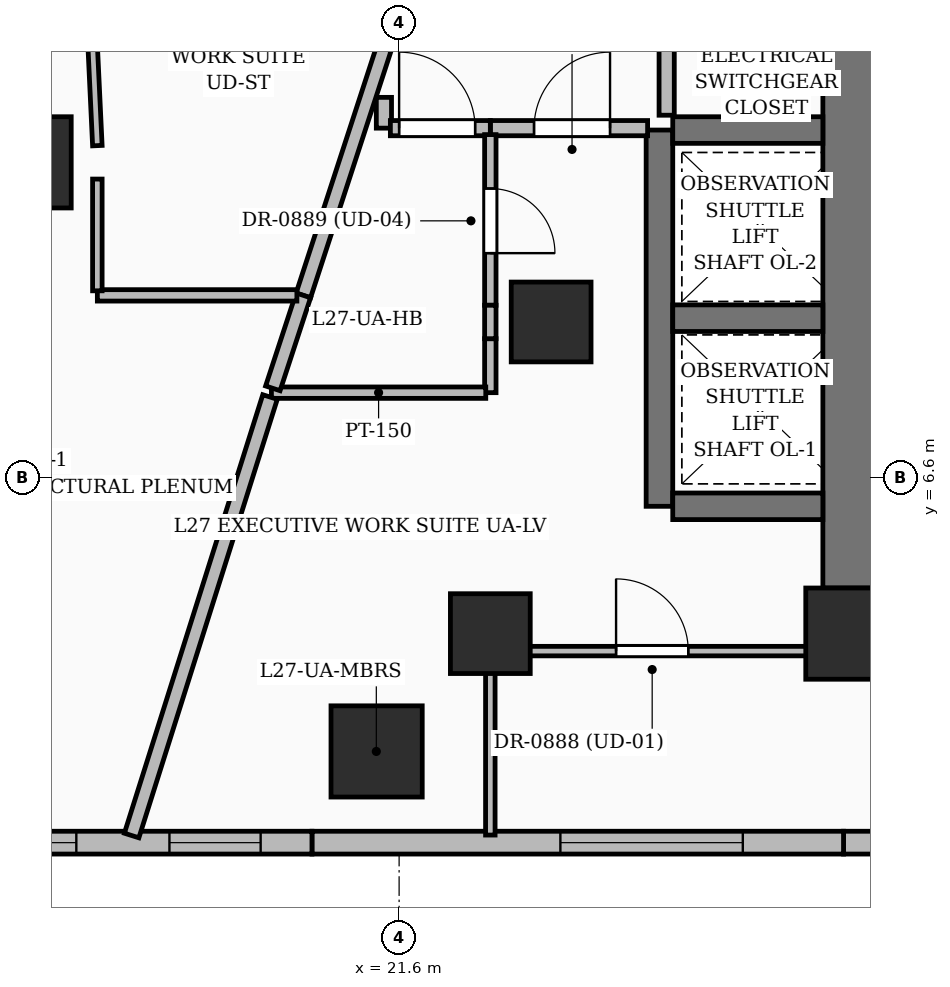
"""IFC4 building model, lengths in metres.
Left out: names, types, materials, properties, quantities, classifications, styles, units other than length and angle.
Written with IfcOpenShell. Run it as: python <this file> out.ifc"""

import sys

from ifc_helpers import new_model, si_unit, direction, frame, frame_2d, origin, origin_2d, place, context, subcontext, project, spatial, rectangle, extrude, element, fill, save


model = new_model("IFC4")
c1 = context("Model", 3, precision=1e-05, world=origin(), true_north=direction((0.0, 1.0)))
c2 = subcontext(c1, "Body", "Model", "MODEL_VIEW")
j1 = project(units=[si_unit("LENGTHUNIT", "METRE"), si_unit("PLANEANGLEUNIT", "RADIAN")], contexts=[c1])
p1 = place(None, origin())
s1 = spatial("IfcSite", under=j1, at=p1, CompositionType="ELEMENT")
p2 = place(p1, origin())
s2 = spatial("IfcBuilding", under=s1, at=p2, CompositionType="ELEMENT")
p3 = place(p2, frame((0.0, 0.0, 110.4)))
s3 = spatial("IfcBuildingStorey", under=s2, at=p3, CompositionType="ELEMENT", Elevation=110.4)
p4 = place(p3, frame((27.55, 4.55, 0.0), z_axis=(0.0, 0.0, 1.0), x_axis=(1.0, 0.0, 0.0)))
e1 = element("IfcColumn", 1, at=p4, inside=s3, PredefinedType="COLUMN", context=c2, shape_type="SweptSolid", body=[
    extrude(rectangle(XDim=1.2, YDim=1.2, at=origin_2d()), origin(), (0.0, 0.0, 1.0), 3.6),
])
for number, where, z_axis, x_axis in (
    (2, (22.8, 4.55, 0.0), (0.0, 0.0, 1.0), (1.0, 0.0, 0.0)),
    (3, (23.6, 8.65, 0.0), (0.0, 0.0, 1.0), (1.0, 0.0, 0.0)),
):
    element("IfcColumn", number, at=place(p3, frame(where, z_axis=z_axis, x_axis=x_axis)), inside=s3, PredefinedType="COLUMN", context=c2, shape_type="SweptSolid", body=[
        extrude(rectangle(XDim=1.05, YDim=1.05, at=origin_2d()), origin(), (0.0, 0.0, 1.0), 3.6),
    ])
p5 = place(p3, frame((27.55, 5.15, 0.0), z_axis=(0.0, 0.0, 1.0), x_axis=(0.0, 1.0, 0.0)))
e4 = element("IfcWall", 4, at=p5, inside=s3, PredefinedType="SHEAR", context=c2, shape_type="SweptSolid", body=[
    extrude(rectangle(XDim=9.0, YDim=0.75, at=frame_2d((4.5, 0.0))), origin(), (0.0, 0.0, 1.0), 3.6),
])
p6 = place(p3, frame((25.025, 6.225, 0.0), z_axis=(0.0, 0.0, 1.0), x_axis=(0.0, 1.0, 0.0)))
e5 = element("IfcWall", 5, at=p6, inside=s3, PredefinedType="SOLIDWALL", context=c2, shape_type="SweptSolid", body=[
    extrude(rectangle(XDim=4.95, YDim=0.35, at=frame_2d((2.475, 0.0))), origin(), (0.0, 0.0, 1.0), 3.6),
])
for number, where, z_axis, x_axis in (
    (6, (25.2, 6.225, 0.0), (0.0, 0.0, 1.0), (1.0, 0.0, 0.0)),
    (7, (25.2, 8.7, 0.0), (0.0, 0.0, 1.0), (1.0, 0.0, 0.0)),
    (8, (25.2, 11.175, 0.0), (0.0, 0.0, 1.0), (1.0, 0.0, 0.0)),
):
    element("IfcWall", number, at=place(p3, frame(where, z_axis=z_axis, x_axis=x_axis)), inside=s3, PredefinedType="SOLIDWALL", context=c2, shape_type="SweptSolid", body=[
        extrude(rectangle(XDim=1.975, YDim=0.35, at=frame_2d((0.988, 0.0))), origin(), (0.0, 0.0, 1.0), 3.6),
    ])
for number, where, z_axis, x_axis in (
    (9, (21.304, 3.0, 0.0), (0.0, 0.0, 1.0), (1.0, 0.0, 0.0)),
    (10, (16.686, 10.75, 0.0), (0.0, 0.0, 1.0), (1.0, 0.0, 0.0)),
):
    element("IfcColumn", number, at=place(p3, frame(where, z_axis=z_axis, x_axis=x_axis)), inside=s3, PredefinedType="COLUMN", context=c2, shape_type="SweptSolid", body=[
        extrude(rectangle(XDim=1.2, YDim=1.2, at=origin_2d()), origin(), (0.0, 0.0, 1.0), 3.6),
    ])
p7 = place(p3, frame((34.16, 1.8, 0.0), z_axis=(0.0, 0.0, 1.0), x_axis=(-1.0, 0.0, 0.0)))
e11 = element("IfcWall", 11, at=p7, inside=s3, PredefinedType="SOLIDWALL", context=c2, shape_type="SweptSolid", body=[
    extrude(rectangle(XDim=6.713, YDim=0.3, at=frame_2d((3.356, 0.0))), origin(), (0.0, 0.0, 1.0), 3.35),
])
p8 = place(p7, frame((2.52, 0.0, 0.8)))
e12 = element("IfcOpeningElement", 12, at=p8, cuts=e11, PredefinedType="OPENING", context=c2, shape_type="SweptSolid", body=[
    extrude(rectangle(XDim=1.2, YDim=1.8, at=frame_2d((0.6, 0.9))), frame((0.0, 0.16, 0.0), z_axis=(0.0, -1.0, 0.0), x_axis=(1.0, 0.0, 0.0)), (0.0, 0.0, 1.0), 0.32),
])
p9 = place(p3, frame((27.447, 1.8, 0.0), z_axis=(0.0, 0.0, 1.0), x_axis=(-1.0, 0.0, 0.0)))
e13 = element("IfcWall", 13, at=p9, inside=s3, PredefinedType="SOLIDWALL", context=c2, shape_type="SweptSolid", body=[
    extrude(rectangle(XDim=6.993, YDim=0.3, at=frame_2d((3.497, 0.0))), origin(), (0.0, 0.0, 1.0), 3.35),
])
p10 = place(p9, frame((1.325, 0.0, 0.6)))
e14 = element("IfcOpeningElement", 14, at=p10, cuts=e13, PredefinedType="OPENING", context=c2, shape_type="SweptSolid", body=[
    extrude(rectangle(XDim=2.4, YDim=2.1, at=frame_2d((1.2, 1.05))), frame((0.0, 0.16, 0.0), z_axis=(0.0, -1.0, 0.0), x_axis=(1.0, 0.0, 0.0)), (0.0, 0.0, 1.0), 0.32),
])
p11 = place(p3, frame((20.453, 1.8, 0.0), z_axis=(0.0, 0.0, 1.0), x_axis=(-1.0, 0.0, 0.0)))
e15 = element("IfcWall", 15, at=p11, inside=s3, PredefinedType="SOLIDWALL", context=c2, shape_type="SweptSolid", body=[
    extrude(rectangle(XDim=6.993, YDim=0.3, at=frame_2d((3.497, 0.0))), origin(), (0.0, 0.0, 1.0), 3.35),
])
p12 = place(p11, frame((0.675, 0.0, 0.8)))
e16 = element("IfcOpeningElement", 16, at=p12, cuts=e15, PredefinedType="OPENING", context=c2, shape_type="SweptSolid", body=[
    extrude(rectangle(XDim=1.2, YDim=1.8, at=frame_2d((0.6, 0.9))), frame((0.0, 0.16, 0.0), z_axis=(0.0, -1.0, 0.0), x_axis=(1.0, 0.0, 0.0)), (0.0, 0.0, 1.0), 0.32),
])
p13 = place(p11, frame((3.1, 0.0, 0.55)))
e17 = element("IfcOpeningElement", 17, at=p13, cuts=e15, PredefinedType="OPENING", context=c2, shape_type="SweptSolid", body=[
    extrude(rectangle(XDim=2.1, YDim=2.4, at=frame_2d((1.05, 1.2))), frame((0.0, 0.16, 0.0), z_axis=(0.0, -1.0, 0.0), x_axis=(1.0, 0.0, 0.0)), (0.0, 0.0, 1.0), 0.32),
])
p14 = place(p3, frame((15.262, 10.746, 0.0), z_axis=(0.0, 0.0, 1.0), x_axis=(0.534880248718, 0.844927878302, 0.0)))
e18 = element("IfcWall", 18, at=p14, inside=s3, PredefinedType="SOLIDWALL", context=c2, shape_type="SweptSolid", body=[
    extrude(rectangle(XDim=6.727, YDim=0.3, at=frame_2d((3.364, 0.0))), origin(), (0.0, 0.0, 1.0), 3.35),
])
p15 = place(p14, frame((0.725, 0.0, 0.55)))
e19 = element("IfcOpeningElement", 19, at=p15, cuts=e18, PredefinedType="OPENING", context=c2, shape_type="SweptSolid", body=[
    extrude(rectangle(XDim=2.1, YDim=2.4, at=frame_2d((1.05, 1.2))), frame((0.0, 0.16, 0.0), z_axis=(0.0, -1.0, 0.0), x_axis=(1.0, 0.0, 0.0)), (0.0, 0.0, 1.0), 0.32),
])
p16 = place(p3, frame((25.12, 11.37, 0.0), z_axis=(0.0, 0.0, 1.0), x_axis=(0.0, 1.0, 0.0)))
e20 = element("IfcWall", 20, at=p16, inside=s3, PredefinedType="PARTITIONING", context=c2, shape_type="SweptSolid", body=[
    extrude(rectangle(XDim=3.34, YDim=0.2, at=frame_2d((1.67, 0.0))), origin(), (0.0, 0.0, 1.0), 3.35),
])
p17 = place(p16, frame((1.9, 0.0, 0.0)))
e21 = element("IfcOpeningElement", 21, at=p17, cuts=e20, PredefinedType="OPENING", context=c2, shape_type="SweptSolid", body=[
    extrude(rectangle(XDim=0.9, YDim=2.1, at=frame_2d((0.45, 1.05))), frame((0.0, 0.11, 0.0), z_axis=(0.0, -1.0, 0.0), x_axis=(1.0, 0.0, 0.0)), (0.0, 0.0, 1.0), 0.22),
])
p18 = place(p3, frame((22.8, 11.2, 0.0), z_axis=(0.0, 0.0, 1.0), x_axis=(1.0, 0.0, 0.0)))
e22 = element("IfcWall", 22, at=p18, inside=s3, PredefinedType="PARTITIONING", context=c2, shape_type="SweptSolid", body=[
    extrude(rectangle(XDim=2.069, YDim=0.2, at=frame_2d((1.035, 0.0))), origin(), (0.0, 0.0, 1.0), 3.35),
])
p19 = place(p18, frame((0.575, 0.0, 0.0)))
e23 = element("IfcOpeningElement", 23, at=p19, cuts=e22, PredefinedType="OPENING", context=c2, shape_type="SweptSolid", body=[
    extrude(rectangle(XDim=1.0, YDim=2.2, at=frame_2d((0.5, 1.1))), frame((0.0, 0.11, 0.0), z_axis=(0.0, -1.0, 0.0), x_axis=(1.0, 0.0, 0.0)), (0.0, 0.0, 1.0), 0.22),
])
p20 = place(p3, frame((21.4, 11.605, 0.0), z_axis=(0.0, 0.0, 1.0), x_axis=(0.0, -1.0, 0.0)))
e24 = element("IfcWall", 24, at=p20, inside=s3, PredefinedType="PARTITIONING", context=c2, shape_type="SweptSolid", body=[
    extrude(rectangle(XDim=0.405, YDim=0.2, at=frame_2d((0.203, 0.0))), origin(), (0.0, 0.0, 1.0), 2.709),
])
p21 = place(p3, frame((21.485, 11.2, 0.0), z_axis=(0.0, 0.0, 1.0), x_axis=(1.0, 0.0, 0.0)))
e25 = element("IfcWall", 25, at=p21, inside=s3, PredefinedType="PARTITIONING", context=c2, shape_type="SweptSolid", body=[
    extrude(rectangle(XDim=1.315, YDim=0.2, at=frame_2d((0.657, 0.0))), origin(), (0.0, 0.0, 1.0), 2.709),
])
p22 = place(p21, frame((0.115, 0.0, 0.0)))
e26 = element("IfcOpeningElement", 26, at=p22, cuts=e25, PredefinedType="OPENING", context=c2, shape_type="SweptSolid", body=[
    extrude(rectangle(XDim=1.0, YDim=2.2, at=frame_2d((0.5, 1.1))), frame((0.0, 0.11, 0.0), z_axis=(0.0, -1.0, 0.0), x_axis=(1.0, 0.0, 0.0)), (0.0, 0.0, 1.0), 0.22),
])
p23 = place(p3, frame((22.8, 8.43, 0.0), z_axis=(0.0, 0.0, 1.0), x_axis=(0.0, -1.0, 0.0)))
e27 = element("IfcWall", 27, at=p23, inside=s3, PredefinedType="PARTITIONING", context=c2, shape_type="SweptSolid", body=[
    extrude(rectangle(XDim=0.71, YDim=0.15, at=frame_2d((0.355, 0.0))), origin(), (0.0, 0.0, 1.0), 3.35),
])
p24 = place(p3, frame((22.8, 11.115, 0.0), z_axis=(0.0, 0.0, 1.0), x_axis=(0.0, -1.0, 0.0)))
e28 = element("IfcWall", 28, at=p24, inside=s3, PredefinedType="PARTITIONING", context=c2, shape_type="SweptSolid", body=[
    extrude(rectangle(XDim=2.245, YDim=0.15, at=frame_2d((1.123, 0.0))), origin(), (0.0, 0.0, 1.0), 2.372),
])
p25 = place(p24, frame((0.709, 0.0, 0.0)))
e29 = element("IfcOpeningElement", 29, at=p25, cuts=e28, PredefinedType="OPENING", context=c2, shape_type="SweptSolid", body=[
    extrude(rectangle(XDim=0.85, YDim=2.1, at=frame_2d((0.425, 1.05))), frame((0.0, 0.085, 0.0), z_axis=(0.0, -1.0, 0.0), x_axis=(1.0, 0.0, 0.0)), (0.0, 0.0, 1.0), 0.17),
])
p26 = place(p3, frame((22.8, 4.32, 0.0), z_axis=(0.0, 0.0, 1.0), x_axis=(1.0, 0.0, 0.0)))
e30 = element("IfcWall", 30, at=p26, inside=s3, PredefinedType="PARTITIONING", context=c2, shape_type="SweptSolid", body=[
    extrude(rectangle(XDim=4.375, YDim=0.125, at=frame_2d((2.188, 0.0))), origin(), (0.0, 0.0, 1.0), 2.436),
])
p27 = place(p26, frame((1.654, 0.0, 0.0)))
e31 = element("IfcOpeningElement", 31, at=p27, cuts=e30, PredefinedType="OPENING", context=c2, shape_type="SweptSolid", body=[
    extrude(rectangle(XDim=0.95, YDim=2.2, at=frame_2d((0.475, 1.1))), frame((0.0, 0.072, 0.0), z_axis=(0.0, -1.0, 0.0), x_axis=(1.0, 0.0, 0.0)), (0.0, 0.0, 1.0), 0.145),
])
p28 = place(p3, frame((19.92, 7.72, 0.0), z_axis=(0.0, 0.0, 1.0), x_axis=(1.0, 0.0, 0.0)))
e32 = element("IfcWall", 32, at=p28, inside=s3, PredefinedType="PARTITIONING", context=c2, shape_type="SweptSolid", body=[
    extrude(rectangle(XDim=2.82, YDim=0.15, at=frame_2d((1.41, 0.0))), origin(), (0.0, 0.0, 1.0), 3.35),
])
p29 = place(p3, frame((21.4, 12.25, 0.0), z_axis=(0.0, 0.0, 1.0), x_axis=(-0.310029019977, -0.950727093741, 0.0)))
e33 = element("IfcWall", 33, at=p29, inside=s3, PredefinedType="PARTITIONING", context=c2, shape_type="SweptSolid", body=[
    extrude(rectangle(XDim=3.418, YDim=0.2, at=frame_2d((1.709, 0.0))), origin(), (0.0, 0.0, 1.0), 2.372),
])
p30 = place(p3, frame((20.34, 9.0, 0.0), z_axis=(0.0, 0.0, 1.0), x_axis=(-0.311842662142, -0.950133755883, 0.0)))
e34 = element("IfcWall", 34, at=p30, inside=s3, PredefinedType="PARTITIONING", context=c2, shape_type="SweptSolid", body=[
    extrude(rectangle(XDim=1.287, YDim=0.2, at=frame_2d((0.644, 0.0))), origin(), (0.0, 0.0, 1.0), 3.35),
])
p31 = place(p3, frame((22.8, 4.272, 0.0), z_axis=(0.0, 0.0, 1.0), x_axis=(0.0, -1.0, 0.0)))
e35 = element("IfcWall", 35, at=p31, inside=s3, PredefinedType="PARTITIONING", context=c2, shape_type="SweptSolid", body=[
    extrude(rectangle(XDim=2.373, YDim=0.125, at=frame_2d((1.186, 0.0))), origin(), (0.0, 0.0, 1.0), 2.57),
])
p32 = place(p3, frame((19.902, 7.663, 0.0), z_axis=(0.0, 0.0, 1.0), x_axis=(-0.300992296292, -0.953626571344, 0.0)))
e36 = element("IfcWall", 36, at=p32, inside=s3, PredefinedType="PARTITIONING", context=c2, shape_type="SweptSolid", body=[
    extrude(rectangle(XDim=6.049, YDim=0.2, at=frame_2d((3.025, 0.0))), origin(), (0.0, 0.0, 1.0), 2.57),
])
p33 = place(p3, frame((17.63, 9.0, 0.0), z_axis=(0.0, 0.0, 1.0), x_axis=(1.0, 0.0, 0.0)))
e37 = element("IfcWall", 37, at=p33, inside=s3, PredefinedType="PARTITIONING", context=c2, shape_type="SweptSolid", body=[
    extrude(rectangle(XDim=2.625, YDim=0.15, at=frame_2d((1.312, 0.0))), origin(), (0.0, 0.0, 1.0), 2.57),
])
p34 = place(p3, frame((17.63, 10.53, 0.0), z_axis=(0.0, 0.0, 1.0), x_axis=(0.0, -1.0, 0.0)))
e38 = element("IfcWall", 38, at=p34, inside=s3, PredefinedType="PARTITIONING", context=c2, shape_type="SweptSolid", body=[
    extrude(rectangle(XDim=1.47, YDim=0.125, at=frame_2d((0.735, 0.0))), origin(), (0.0, 0.0, 1.0), 2.372),
])
p35 = place(p3, frame((17.487, 14.013, 0.0), z_axis=(0.0, 0.0, 1.0), x_axis=(0.046883561563, -0.998900361225, 0.0)))
e39 = element("IfcWall", 39, at=p35, inside=s3, PredefinedType="PARTITIONING", context=c2, shape_type="SweptSolid", body=[
    extrude(rectangle(XDim=3.046, YDim=0.125, at=frame_2d((1.523, 0.0))), origin(), (0.0, 0.0, 1.0), 2.57),
])
p36 = place(p3, frame((22.8, 8.43, 0.0), z_axis=(0.0, 0.0, 1.0), x_axis=(0.0, 1.0, 0.0)))
e40 = element("IfcWall", 40, at=p36, inside=s3, PredefinedType="PARTITIONING", context=c2, shape_type="SweptSolid", body=[
    extrude(rectangle(XDim=0.44, YDim=0.15, at=frame_2d((0.22, 0.0))), origin(), (0.0, 0.0, 1.0), 2.372),
])
p37 = place(p10, origin())
e41 = element("IfcWindow", 41, at=p37, inside=s3, PartitioningType="SINGLE_PANEL", PredefinedType="WINDOW", context=c2, shape_type="SweptSolid", body=[
    extrude(rectangle(XDim=2.4, YDim=2.1, at=frame_2d((1.2, 1.05))), frame((0.0, 0.03, 0.0), z_axis=(0.0, -1.0, 0.0), x_axis=(1.0, 0.0, 0.0)), (0.0, 0.0, 1.0), 0.06),
])
fill(e14, e41)
p38 = place(p12, origin())
e42 = element("IfcWindow", 42, at=p38, inside=s3, PartitioningType="SINGLE_PANEL", PredefinedType="WINDOW", context=c2, shape_type="SweptSolid", body=[
    extrude(rectangle(XDim=1.2, YDim=1.8, at=frame_2d((0.6, 0.9))), frame((0.0, 0.03, 0.0), z_axis=(0.0, -1.0, 0.0), x_axis=(1.0, 0.0, 0.0)), (0.0, 0.0, 1.0), 0.06),
])
fill(e16, e42)
p39 = place(p13, origin())
e43 = element("IfcWindow", 43, at=p39, inside=s3, PartitioningType="SINGLE_PANEL", PredefinedType="WINDOW", context=c2, shape_type="SweptSolid", body=[
    extrude(rectangle(XDim=2.1, YDim=2.4, at=frame_2d((1.05, 1.2))), frame((0.0, 0.03, 0.0), z_axis=(0.0, -1.0, 0.0), x_axis=(1.0, 0.0, 0.0)), (0.0, 0.0, 1.0), 0.06),
])
fill(e17, e43)
p40 = place(p19, origin())
e44 = element("IfcDoor", 44, at=p40, inside=s3, OperationType="SINGLE_SWING_RIGHT", PredefinedType="DOOR", context=c2, shape_type="SweptSolid", body=[
    extrude(rectangle(XDim=1.0, YDim=2.2, at=frame_2d((0.5, 1.1))), frame((0.0, 0.025, 0.0), z_axis=(0.0, -1.0, 0.0), x_axis=(1.0, 0.0, 0.0)), (0.0, 0.0, 1.0), 0.05),
])
fill(e23, e44)
p41 = place(p27, origin())
e45 = element("IfcDoor", 45, at=p41, inside=s3, OperationType="SINGLE_SWING_LEFT", PredefinedType="DOOR", context=c2, shape_type="SweptSolid", body=[
    extrude(rectangle(XDim=0.95, YDim=2.2, at=frame_2d((0.475, 1.1))), frame((0.0, 0.025, 0.0), z_axis=(0.0, -1.0, 0.0), x_axis=(1.0, 0.0, 0.0)), (0.0, 0.0, 1.0), 0.05),
])
fill(e31, e45)
p42 = place(p25, origin())
e46 = element("IfcDoor", 46, at=p42, inside=s3, OperationType="SINGLE_SWING_RIGHT", PredefinedType="DOOR", context=c2, shape_type="SweptSolid", body=[
    extrude(rectangle(XDim=0.85, YDim=2.1, at=frame_2d((0.425, 1.05))), frame((0.0, 0.025, 0.0), z_axis=(0.0, -1.0, 0.0), x_axis=(1.0, 0.0, 0.0)), (0.0, 0.0, 1.0), 0.05),
])
fill(e29, e46)
p43 = place(p22, origin())
e47 = element("IfcDoor", 47, at=p43, inside=s3, OperationType="SINGLE_SWING_LEFT", PredefinedType="DOOR", context=c2, shape_type="SweptSolid", body=[
    extrude(rectangle(XDim=1.0, YDim=2.2, at=frame_2d((0.5, 1.1))), frame((0.0, 0.025, 0.0), z_axis=(0.0, -1.0, 0.0), x_axis=(1.0, 0.0, 0.0)), (0.0, 0.0, 1.0), 0.05),
])
fill(e26, e47)
save(model, sys.argv[1])
